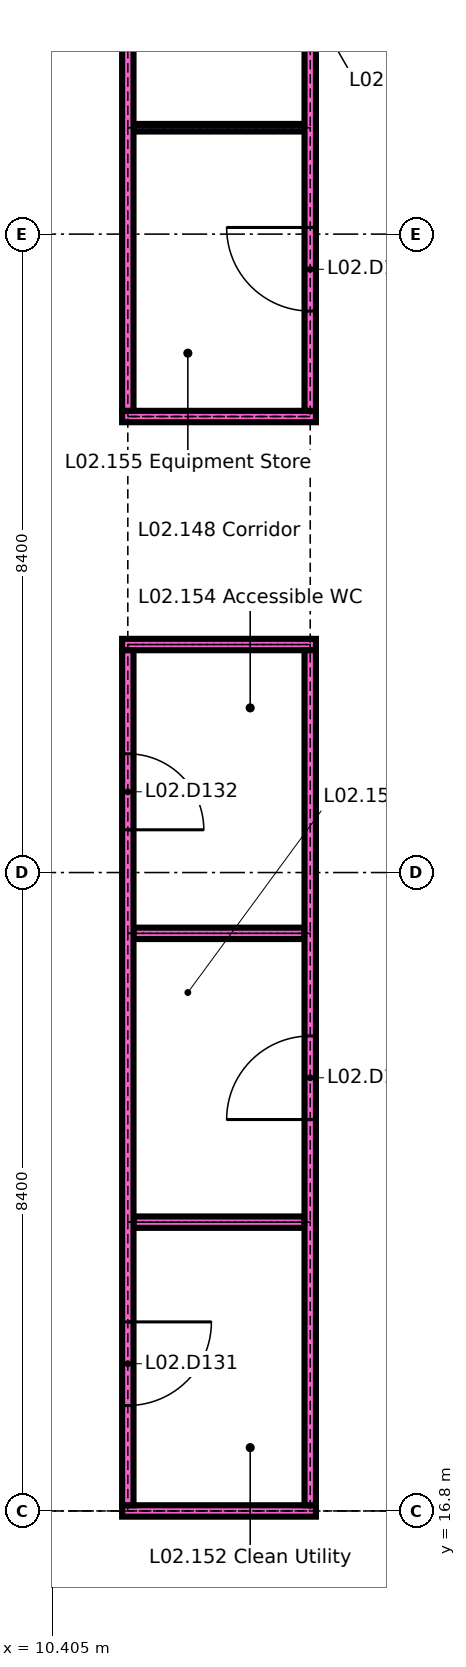
"""IFC4 building model, lengths in metres.
Left out: names, types, materials, properties, quantities, classifications, styles, units other than length and angle.
Written with IfcOpenShell. Run it as: python <this file> out.ifc"""

import sys

from ifc_helpers import new_model, si_unit, direction, frame, frame_2d, origin, place, context, subcontext, project, spatial, rectangle, extrude, element, fill, save


model = new_model("IFC4")
c1 = context("Model", 3, precision=1e-05, world=origin(), true_north=direction((0.0, 1.0)))
c2 = subcontext(c1, "Body", "Model", "MODEL_VIEW")
j1 = project(units=[si_unit("LENGTHUNIT", "METRE"), si_unit("PLANEANGLEUNIT", "RADIAN")], contexts=[c1])
p1 = place(None, origin())
s1 = spatial("IfcSite", under=j1, at=p1, CompositionType="ELEMENT")
p2 = place(p1, origin())
s2 = spatial("IfcBuilding", under=s1, at=p2, CompositionType="ELEMENT")
p3 = place(p2, frame((0.0, 0.0, 8.4)))
s3 = spatial("IfcBuildingStorey", under=s2, at=p3, CompositionType="ELEMENT", Elevation=8.4)
p4 = place(p3, frame((11.325, 16.8, 0.0), z_axis=(0.0, 0.0, 1.0), x_axis=(1.0, 0.0, 0.0)))
e1 = element("IfcWall", 1, at=p4, inside=s3, PredefinedType="PARTITIONING", context=c2, shape_type="SweptSolid", body=[
    extrude(rectangle(XDim=2.55, YDim=0.15, at=frame_2d((1.275, 0.0))), origin(), (0.0, 0.0, 1.0), 4.2),
])
for number, where, z_axis, x_axis in (
    (2, (11.475, 20.6, 0.0), (0.0, 0.0, 1.0), (1.0, 0.0, 0.0)),
    (3, (11.475, 24.4, 0.0), (0.0, 0.0, 1.0), (1.0, 0.0, 0.0)),
):
    element("IfcWall", number, at=place(p3, frame(where, z_axis=z_axis, x_axis=x_axis)), inside=s3, PredefinedType="PARTITIONING", context=c2, shape_type="SweptSolid", body=[
        extrude(rectangle(XDim=2.25, YDim=0.15, at=frame_2d((1.125, 0.0))), origin(), (0.0, 0.0, 1.0), 4.2),
    ])
for number, where, z_axis, x_axis in (
    (4, (11.325, 28.2, 0.0), (0.0, 0.0, 1.0), (1.0, 0.0, 0.0)),
    (5, (11.325, 31.2, 0.0), (0.0, 0.0, 1.0), (1.0, 0.0, 0.0)),
):
    element("IfcWall", number, at=place(p3, frame(where, z_axis=z_axis, x_axis=x_axis)), inside=s3, PredefinedType="PARTITIONING", context=c2, shape_type="SweptSolid", body=[
        extrude(rectangle(XDim=2.55, YDim=0.15, at=frame_2d((1.275, 0.0))), origin(), (0.0, 0.0, 1.0), 4.2),
    ])
p5 = place(p3, frame((11.475, 35.0, 0.0), z_axis=(0.0, 0.0, 1.0), x_axis=(1.0, 0.0, 0.0)))
e6 = element("IfcWall", 6, at=p5, inside=s3, PredefinedType="PARTITIONING", context=c2, shape_type="SweptSolid", body=[
    extrude(rectangle(XDim=2.25, YDim=0.1, at=frame_2d((1.125, 0.0))), origin(), (0.0, 0.0, 1.0), 4.2),
])
p6 = place(p3, frame((11.4, 16.875, 0.0), z_axis=(0.0, 0.0, 1.0), x_axis=(0.0, 1.0, 0.0)))
e7 = element("IfcWall", 7, at=p6, inside=s3, PredefinedType="PARTITIONING", context=c2, shape_type="SweptSolid", body=[
    extrude(rectangle(XDim=11.25, YDim=0.15, at=frame_2d((5.625, 0.0))), origin(), (0.0, 0.0, 1.0), 4.2),
])
p7 = place(p6, frame((1.312, 0.0, 0.0)))
e8 = element("IfcOpeningElement", 8, at=p7, cuts=e7, PredefinedType="OPENING", context=c2, shape_type="SweptSolid", body=[
    extrude(rectangle(XDim=1.1, YDim=2.1, at=frame_2d((0.55, 1.05))), frame((0.0, 0.085, 0.0), z_axis=(0.0, -1.0, 0.0), x_axis=(1.0, 0.0, 0.0)), (0.0, 0.0, 1.0), 0.17),
])
p8 = place(p6, frame((8.887, 0.0, 0.0)))
e9 = element("IfcOpeningElement", 9, at=p8, cuts=e7, PredefinedType="OPENING", context=c2, shape_type="SweptSolid", body=[
    extrude(rectangle(XDim=1.0, YDim=2.1, at=frame_2d((0.5, 1.05))), frame((0.0, 0.085, 0.0), z_axis=(0.0, -1.0, 0.0), x_axis=(1.0, 0.0, 0.0)), (0.0, 0.0, 1.0), 0.17),
])
p9 = place(p3, frame((11.4, 31.275, 0.0), z_axis=(0.0, 0.0, 1.0), x_axis=(0.0, 1.0, 0.0)))
e10 = element("IfcWall", 10, at=p9, inside=s3, PredefinedType="PARTITIONING", context=c2, shape_type="SweptSolid", body=[
    extrude(rectangle(XDim=18.925, YDim=0.15, at=frame_2d((9.462, 0.0))), origin(), (0.0, 0.0, 1.0), 4.2),
])
p10 = place(p9, frame((5.125, 0.0, 0.0)))
e11 = element("IfcOpeningElement", 11, at=p10, cuts=e10, PredefinedType="OPENING", context=c2, shape_type="SweptSolid", body=[
    extrude(rectangle(XDim=1.0, YDim=2.1, at=frame_2d((0.5, 1.05))), frame((0.0, 0.085, 0.0), z_axis=(0.0, -1.0, 0.0), x_axis=(1.0, 0.0, 0.0)), (0.0, 0.0, 1.0), 0.17),
])
p11 = place(p9, frame((12.725, 0.0, 0.0)))
e12 = element("IfcOpeningElement", 12, at=p11, cuts=e10, PredefinedType="OPENING", context=c2, shape_type="SweptSolid", body=[
    extrude(rectangle(XDim=1.0, YDim=2.1, at=frame_2d((0.5, 1.05))), frame((0.0, 0.085, 0.0), z_axis=(0.0, -1.0, 0.0), x_axis=(1.0, 0.0, 0.0)), (0.0, 0.0, 1.0), 0.17),
])
p12 = place(p3, frame((13.8, 16.875, 0.0), z_axis=(0.0, 0.0, 1.0), x_axis=(0.0, 1.0, 0.0)))
e13 = element("IfcWall", 13, at=p12, inside=s3, PredefinedType="PARTITIONING", context=c2, shape_type="SweptSolid", body=[
    extrude(rectangle(XDim=11.25, YDim=0.15, at=frame_2d((5.625, 0.0))), origin(), (0.0, 0.0, 1.0), 4.2),
])
p13 = place(p12, frame((5.075, 0.0, 0.0)))
e14 = element("IfcOpeningElement", 14, at=p13, cuts=e13, PredefinedType="OPENING", context=c2, shape_type="SweptSolid", body=[
    extrude(rectangle(XDim=1.1, YDim=2.1, at=frame_2d((0.55, 1.05))), frame((0.0, 0.085, 0.0), z_axis=(0.0, -1.0, 0.0), x_axis=(1.0, 0.0, 0.0)), (0.0, 0.0, 1.0), 0.17),
])
p14 = place(p3, frame((13.8, 31.275, 0.0), z_axis=(0.0, 0.0, 1.0), x_axis=(0.0, 1.0, 0.0)))
e15 = element("IfcWall", 15, at=p14, inside=s3, PredefinedType="PARTITIONING", context=c2, shape_type="SweptSolid", body=[
    extrude(rectangle(XDim=18.925, YDim=0.15, at=frame_2d((9.462, 0.0))), origin(), (0.0, 0.0, 1.0), 4.2),
])
p15 = place(p14, frame((1.312, 0.0, 0.0)))
e16 = element("IfcOpeningElement", 16, at=p15, cuts=e15, PredefinedType="OPENING", context=c2, shape_type="SweptSolid", body=[
    extrude(rectangle(XDim=1.1, YDim=2.1, at=frame_2d((0.55, 1.05))), frame((0.0, 0.085, 0.0), z_axis=(0.0, -1.0, 0.0), x_axis=(1.0, 0.0, 0.0)), (0.0, 0.0, 1.0), 0.17),
])
p16 = place(p14, frame((8.875, 0.0, 0.0)))
e17 = element("IfcOpeningElement", 17, at=p16, cuts=e15, PredefinedType="OPENING", context=c2, shape_type="SweptSolid", body=[
    extrude(rectangle(XDim=1.1, YDim=2.1, at=frame_2d((0.55, 1.05))), frame((0.0, 0.085, 0.0), z_axis=(0.0, -1.0, 0.0), x_axis=(1.0, 0.0, 0.0)), (0.0, 0.0, 1.0), 0.17),
])
p17 = place(p14, frame((16.475, 0.0, 0.0)))
e18 = element("IfcOpeningElement", 18, at=p17, cuts=e15, PredefinedType="OPENING", context=c2, shape_type="SweptSolid", body=[
    extrude(rectangle(XDim=1.1, YDim=2.1, at=frame_2d((0.55, 1.05))), frame((0.0, 0.085, 0.0), z_axis=(0.0, -1.0, 0.0), x_axis=(1.0, 0.0, 0.0)), (0.0, 0.0, 1.0), 0.17),
])
p18 = place(p7, origin())
e19 = element("IfcDoor", 19, at=p18, inside=s3, OperationType="SINGLE_SWING_RIGHT", PredefinedType="DOOR", context=c2, shape_type="SweptSolid", body=[
    extrude(rectangle(XDim=1.1, YDim=2.1, at=frame_2d((0.55, 1.05))), frame((0.0, 0.025, 0.0), z_axis=(0.0, -1.0, 0.0), x_axis=(1.0, 0.0, 0.0)), (0.0, 0.0, 1.0), 0.05),
])
fill(e8, e19)
p19 = place(p8, origin())
e20 = element("IfcDoor", 20, at=p19, inside=s3, OperationType="SINGLE_SWING_LEFT", PredefinedType="DOOR", context=c2, shape_type="SweptSolid", body=[
    extrude(rectangle(XDim=1.0, YDim=2.1, at=frame_2d((0.5, 1.05))), frame((0.0, 0.025, 0.0), z_axis=(0.0, -1.0, 0.0), x_axis=(1.0, 0.0, 0.0)), (0.0, 0.0, 1.0), 0.05),
])
fill(e9, e20)
p20 = place(p13, origin())
e21 = element("IfcDoor", 21, at=p20, inside=s3, OperationType="SINGLE_SWING_RIGHT", PredefinedType="DOOR", context=c2, shape_type="SweptSolid", body=[
    extrude(rectangle(XDim=1.1, YDim=2.1, at=frame_2d((0.55, 1.05))), frame((0.0, 0.025, 0.0), z_axis=(0.0, -1.0, 0.0), x_axis=(1.0, 0.0, 0.0)), (0.0, 0.0, 1.0), 0.05),
])
fill(e14, e21)
p21 = place(p15, origin())
e22 = element("IfcDoor", 22, at=p21, inside=s3, OperationType="SINGLE_SWING_LEFT", PredefinedType="DOOR", context=c2, shape_type="SweptSolid", body=[
    extrude(rectangle(XDim=1.1, YDim=2.1, at=frame_2d((0.55, 1.05))), frame((0.0, 0.025, 0.0), z_axis=(0.0, -1.0, 0.0), x_axis=(1.0, 0.0, 0.0)), (0.0, 0.0, 1.0), 0.05),
])
fill(e16, e22)
save(model, sys.argv[1])
